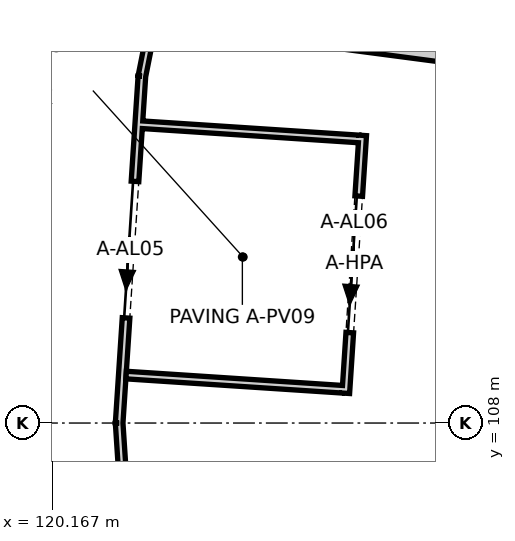
"""IFC4 building model, lengths in metres.
Left out: names, types, materials, properties, quantities, classifications, styles, units other than length and angle.
Written with IfcOpenShell. Run it as: python <this file> out.ifc"""

import sys

from ifc_helpers import new_model, si_unit, direction, frame, frame_2d, origin, place, context, subcontext, project, spatial, polyline, rectangle, outline, extrude, element, fill, save


model = new_model("IFC4")
c1 = context("Model", 3, precision=1e-05, world=origin(), true_north=direction((0.0, 1.0)))
c2 = subcontext(c1, "Body", "Model", "MODEL_VIEW")
j1 = project(units=[si_unit("LENGTHUNIT", "METRE"), si_unit("PLANEANGLEUNIT", "RADIAN")], contexts=[c1])
p1 = place(None, origin())
s1 = spatial("IfcSite", under=j1, at=p1, CompositionType="ELEMENT")
p2 = place(p1, origin())
s2 = spatial("IfcBuilding", under=s1, at=p2, CompositionType="ELEMENT")
p3 = place(p2, origin())
s3 = spatial("IfcBuildingStorey", under=s2, at=p3, CompositionType="ELEMENT", Elevation=0.0)
p4 = place(p3, frame((122.241, 117.046, 0.0), z_axis=(0.0, 0.0, 1.0), x_axis=(-0.195078787454, -0.9807875747, 0.0)))
e1 = element("IfcWall", 1, at=p4, inside=s3, PredefinedType="PARTITIONING", context=c2, shape_type="SweptSolid", body=[
    extrude(outline(polyline([(-0.003, -0.05), (4.575, -0.05), (4.569, 0.05), (0.003, 0.05), (-0.003, -0.05)])), origin(), (0.0, 0.0, 1.0), 10.842),
])
p5 = place(p3, frame((121.349, 112.562, 0.0), z_axis=(0.0, 0.0, 1.0), x_axis=(-0.065420166596, -0.997857806405, 0.0)))
e2 = element("IfcWall", 2, at=p5, inside=s3, PredefinedType="PARTITIONING", context=c2, shape_type="SweptSolid", body=[
    extrude(outline(polyline([(-0.003, -0.05), (4.575, -0.05), (4.568, 0.05), (0.003, 0.05), (-0.003, -0.05)])), origin(), (0.0, 0.0, 1.0), 10.842),
])
p6 = place(p5, frame((1.386, 0.0, 0.0)))
e3 = element("IfcOpeningElement", 3, at=p6, cuts=e2, PredefinedType="OPENING", context=c2, shape_type="SweptSolid", body=[
    extrude(rectangle(XDim=1.8, YDim=2.4, at=frame_2d((0.9, 1.2))), frame((0.0, 0.06, 0.0), z_axis=(0.0, -1.0, 0.0), x_axis=(1.0, 0.0, 0.0)), (0.0, 0.0, 1.0), 0.12),
])
p7 = place(p3, frame((121.05, 108.0, 0.0), z_axis=(0.0, 0.0, 1.0), x_axis=(0.065420166596, -0.997857806405, 0.0)))
e4 = element("IfcWall", 4, at=p7, inside=s3, PredefinedType="PARTITIONING", context=c2, shape_type="SweptSolid", body=[
    extrude(outline(polyline([(-0.003, -0.05), (4.575, -0.05), (4.568, 0.05), (0.003, 0.05), (-0.003, -0.05)])), origin(), (0.0, 0.0, 1.0), 10.841),
])
p8 = place(p3, frame((121.357, 111.924, 0.0), z_axis=(0.0, 0.0, 1.0), x_axis=(0.997856215477, -0.065444428588, 0.0)))
e5 = element("IfcWall", 5, at=p8, inside=s3, PredefinedType="PARTITIONING", context=c2, shape_type="SweptSolid", body=[
    extrude(rectangle(XDim=2.85, YDim=0.1, at=frame_2d((1.425, 0.0))), origin(), (0.0, 0.0, 1.0), 3.0),
])
p9 = place(p3, frame((121.142, 108.631, 0.0), z_axis=(0.0, 0.0, 1.0), x_axis=(0.99785584855, -0.065450023033, 0.0)))
e6 = element("IfcWall", 6, at=p9, inside=s3, PredefinedType="PARTITIONING", context=c2, shape_type="SweptSolid", body=[
    extrude(rectangle(XDim=2.85, YDim=0.1, at=frame_2d((1.425, 0.0))), origin(), (0.0, 0.0, 1.0), 3.0),
])
p10 = place(p3, frame((124.254, 111.784, 0.0), z_axis=(0.0, 0.0, 1.0), x_axis=(-0.065418004517, -0.997857948149, 0.0)))
e7 = element("IfcWall", 7, at=p10, inside=s3, PredefinedType="PARTITIONING", context=c2, shape_type="SweptSolid", body=[
    extrude(rectangle(XDim=3.4, YDim=0.1, at=frame_2d((1.7, 0.0))), origin(), (0.0, 0.0, 1.0), 3.0),
])
p11 = place(p10, frame((0.8, 0.0, 0.0)))
e8 = element("IfcOpeningElement", 8, at=p11, cuts=e7, PredefinedType="OPENING", context=c2, shape_type="SweptSolid", body=[
    extrude(rectangle(XDim=1.8, YDim=2.4, at=frame_2d((0.9, 1.2))), frame((0.0, 0.06, 0.0), z_axis=(0.0, -1.0, 0.0), x_axis=(1.0, 0.0, 0.0)), (0.0, 0.0, 1.0), 0.12),
])
p12 = place(p3, frame((123.34, 113.107, 0.0), z_axis=(0.0, 0.0, 1.0), x_axis=(0.991445150216, -0.130523998224, 0.0)))
e9 = element("IfcWall", 9, at=p12, inside=s3, PredefinedType="SOLIDWALL", context=c2, shape_type="SweptSolid", body=[
    extrude(outline(polyline([(-0.107, -0.1), (2.093, -0.1), (1.906, 0.1), (0.107, 0.1), (-0.107, -0.1)])), origin(), (0.0, 0.0, 1.0), 0.6),
])
p13 = place(p6, origin())
e10 = element("IfcDoor", 10, at=p13, inside=s3, OperationType="DOUBLE_DOOR_SLIDING", PredefinedType="DOOR", context=c2, shape_type="SweptSolid", body=[
    extrude(rectangle(XDim=1.8, YDim=2.4, at=frame_2d((0.9, 1.2))), frame((0.0, 0.025, 0.0), z_axis=(0.0, -1.0, 0.0), x_axis=(1.0, 0.0, 0.0)), (0.0, 0.0, 1.0), 0.05),
])
fill(e3, e10)
p14 = place(p11, origin())
e11 = element("IfcDoor", 11, at=p14, inside=s3, OperationType="DOUBLE_DOOR_SLIDING", PredefinedType="DOOR", context=c2, shape_type="SweptSolid", body=[
    extrude(rectangle(XDim=1.8, YDim=2.4, at=frame_2d((0.9, 1.2))), frame((0.0, 0.025, 0.0), z_axis=(0.0, -1.0, 0.0), x_axis=(1.0, 0.0, 0.0)), (0.0, 0.0, 1.0), 0.05),
])
fill(e8, e11)
save(model, sys.argv[1])
